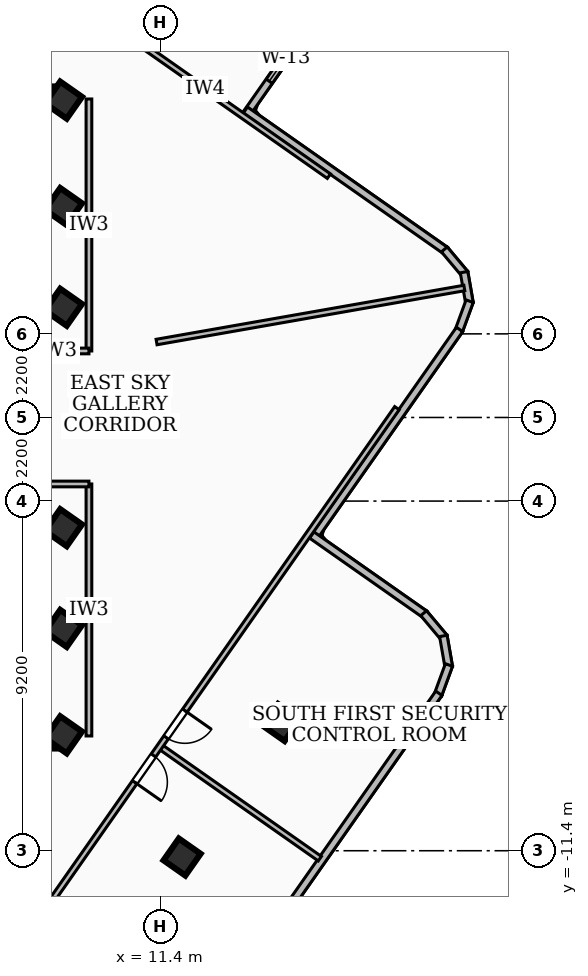
"""IFC4 building model, lengths in metres.
Left out: names, types, materials, properties, quantities, classifications, styles, units other than length and angle.
Written with IfcOpenShell. Run it as: python <this file> out.ifc"""

import sys

from ifc_helpers import new_model, si_unit, direction, frame, frame_2d, origin, origin_2d, place, context, subcontext, project, spatial, rectangle, extrude, element, fill, save


model = new_model("IFC4")
c1 = context("Model", 3, precision=1e-05, world=origin(), true_north=direction((0.0, 1.0)))
c2 = subcontext(c1, "Body", "Model", "MODEL_VIEW")
j1 = project(units=[si_unit("LENGTHUNIT", "METRE"), si_unit("PLANEANGLEUNIT", "RADIAN")], contexts=[c1])
p1 = place(None, origin())
s1 = spatial("IfcSite", under=j1, at=p1, CompositionType="ELEMENT")
p2 = place(p1, origin())
s2 = spatial("IfcBuilding", under=s1, at=p2, CompositionType="ELEMENT")
p3 = place(p2, frame((0.0, 0.0, 268.02)))
s3 = spatial("IfcBuildingStorey", under=s2, at=p3, CompositionType="ELEMENT", Elevation=268.02)
for number, where, z_axis, x_axis in (
    (1, (-8.78, 8.51, 0.0), (0.0, 0.0, 1.0), (1.0, 0.0, 0.0)),
    (2, (8.78, -8.51, 0.0), (0.0, 0.0, 1.0), (-1.0, 0.0, 0.0)),
):
    element("IfcWall", number, at=place(p3, frame(where, z_axis=z_axis, x_axis=x_axis)), inside=s3, PredefinedType="SHEAR", context=c2, shape_type="SweptSolid", body=[
        extrude(rectangle(XDim=17.56, YDim=0.4, at=frame_2d((8.78, 0.0))), origin(), (0.0, 0.0, 1.0), 3.16),
    ])
for number, where, z_axis, x_axis in (
    (3, (8.85, -5.55, 0.0), (0.0, 0.0, 1.0), (0.574, 0.819, 0.0)),
    (4, (8.85, -2.9, 0.0), (0.0, 0.0, 1.0), (0.574, 0.819, 0.0)),
    (5, (8.85, 2.9, 0.0), (0.0, 0.0, 1.0), (0.574, 0.819, 0.0)),
    (6, (8.85, 5.55, 0.0), (0.0, 0.0, 1.0), (0.574, 0.819, 0.0)),
    (7, (8.85, -8.35, 0.0), (0.0, 0.0, 1.0), (0.574, 0.819, 0.0)),
    (8, (8.85, 8.35, 0.0), (0.0, 0.0, 1.0), (0.574, 0.819, 0.0)),
    (9, (11.971, -11.566, 0.0), (0.0, 0.0, 1.0), (0.574, 0.819, 0.0)),
    (10, (14.583, -8.026, 0.0), (0.0, 0.0, 1.0), (0.574, 0.819, 0.0)),
):
    element("IfcColumn", number, at=place(p3, frame(where, z_axis=z_axis, x_axis=x_axis)), inside=s3, PredefinedType="COLUMN", context=c2, shape_type="SweptSolid", body=[
        extrude(rectangle(XDim=0.7, YDim=0.7, at=origin_2d()), origin(), (0.0, 0.0, 1.0), 3.42),
    ])
p4 = place(p3, frame((18.386, 14.724, 0.0), z_axis=(0.0, 0.0, 1.0), x_axis=(-0.574193796103, -0.818719417454, 0.0)))
e11 = element("IfcWall", 11, at=p4, inside=s3, PredefinedType="SOLIDWALL", context=c2, shape_type="SweptSolid", body=[
    extrude(rectangle(XDim=8.241, YDim=0.2, at=frame_2d((4.121, 0.0))), origin(), (0.0, 0.0, 1.0), 3.16),
])
p5 = place(p4, frame((5.678, 0.0, 0.85)))
e12 = element("IfcOpeningElement", 12, at=p5, cuts=e11, PredefinedType="OPENING", context=c2, shape_type="SweptSolid", body=[
    extrude(rectangle(XDim=1.5, YDim=1.8, at=frame_2d((0.75, 0.9))), frame((0.0, 0.11, 0.0), z_axis=(0.0, -1.0, 0.0), x_axis=(1.0, 0.0, 0.0)), (0.0, 0.0, 1.0), 0.22),
])
p6 = place(p3, frame((13.635, 8.088, 0.0), z_axis=(0.0, 0.0, 1.0), x_axis=(0.818654548261, -0.574286279317, 0.0)))
e13 = element("IfcWall", 13, at=p6, inside=s3, PredefinedType="SOLIDWALL", context=c2, shape_type="SweptSolid", body=[
    extrude(rectangle(XDim=6.441, YDim=0.2, at=frame_2d((3.22, 0.0))), origin(), (0.0, 0.0, 1.0), 3.16),
])
p7 = place(p3, frame((18.872, 4.422, 0.0), z_axis=(0.0, 0.0, 1.0), x_axis=(0.642816318642, -0.766020352528, 0.0)))
e14 = element("IfcWall", 14, at=p7, inside=s3, PredefinedType="SOLIDWALL", context=c2, shape_type="SweptSolid", body=[
    extrude(rectangle(XDim=0.838, YDim=0.2, at=frame_2d((0.419, 0.0))), origin(), (0.0, 0.0, 1.0), 3.16),
])
p8 = place(p3, frame((19.391, 3.824, 0.0), z_axis=(0.0, 0.0, 1.0), x_axis=(0.171877988141, -0.985118245285, 0.0)))
e15 = element("IfcWall", 15, at=p8, inside=s3, PredefinedType="SOLIDWALL", context=c2, shape_type="SweptSolid", body=[
    extrude(rectangle(XDim=0.825, YDim=0.2, at=frame_2d((0.413, 0.0))), origin(), (0.0, 0.0, 1.0), 3.16),
])
p9 = place(p3, frame((19.538, 3.059, 0.0), z_axis=(0.0, 0.0, 1.0), x_axis=(-0.344083284363, -0.938939131905, 0.0)))
e16 = element("IfcWall", 16, at=p9, inside=s3, PredefinedType="SOLIDWALL", context=c2, shape_type="SweptSolid", body=[
    extrude(rectangle(XDim=0.837, YDim=0.2, at=frame_2d((0.418, 0.0))), origin(), (0.0, 0.0, 1.0), 3.16),
])
p10 = place(p3, frame((19.273, 2.316, 0.0), z_axis=(0.0, 0.0, 1.0), x_axis=(-0.574227764949, -0.818695592978, 0.0)))
e17 = element("IfcWall", 17, at=p10, inside=s3, PredefinedType="SOLIDWALL", context=c2, shape_type="SweptSolid", body=[
    extrude(rectangle(XDim=6.741, YDim=0.2, at=frame_2d((3.371, 0.0))), origin(), (0.0, 0.0, 1.0), 3.16),
])
p11 = place(p3, frame((15.383, -3.092, 0.0), z_axis=(0.0, 0.0, 1.0), x_axis=(0.818664531158, -0.574272048269, 0.0)))
e18 = element("IfcWall", 18, at=p11, inside=s3, PredefinedType="SOLIDWALL", context=c2, shape_type="SweptSolid", body=[
    extrude(rectangle(XDim=3.641, YDim=0.2, at=frame_2d((1.821, 0.0))), origin(), (0.0, 0.0, 1.0), 3.16),
])
p12 = place(p3, frame((18.328, -5.15, 0.0), z_axis=(0.0, 0.0, 1.0), x_axis=(0.642303159159, -0.766450684477, 0.0)))
e19 = element("IfcWall", 19, at=p12, inside=s3, PredefinedType="SOLIDWALL", context=c2, shape_type="SweptSolid", body=[
    extrude(rectangle(XDim=0.838, YDim=0.2, at=frame_2d((0.419, 0.0))), origin(), (0.0, 0.0, 1.0), 3.16),
])
p13 = place(p3, frame((18.846, -5.748, 0.0), z_axis=(0.0, 0.0, 1.0), x_axis=(0.172165058078, -0.985068115806, 0.0)))
e20 = element("IfcWall", 20, at=p13, inside=s3, PredefinedType="SOLIDWALL", context=c2, shape_type="SweptSolid", body=[
    extrude(rectangle(XDim=0.825, YDim=0.2, at=frame_2d((0.413, 0.0))), origin(), (0.0, 0.0, 1.0), 3.16),
])
p14 = place(p3, frame((18.993, -6.513, 0.0), z_axis=(0.0, 0.0, 1.0), x_axis=(-0.343449935769, -0.93917098636, 0.0)))
e21 = element("IfcWall", 21, at=p14, inside=s3, PredefinedType="SOLIDWALL", context=c2, shape_type="SweptSolid", body=[
    extrude(rectangle(XDim=0.838, YDim=0.2, at=frame_2d((0.419, 0.0))), origin(), (0.0, 0.0, 1.0), 3.16),
])
p15 = place(p3, frame((18.728, -7.257, 0.0), z_axis=(0.0, 0.0, 1.0), x_axis=(-0.574152395536, -0.818748451419, 0.0)))
e22 = element("IfcWall", 22, at=p15, inside=s3, PredefinedType="SOLIDWALL", context=c2, shape_type="SweptSolid", body=[
    extrude(rectangle(XDim=9.923, YDim=0.2, at=frame_2d((4.961, 0.0))), origin(), (0.0, 0.0, 1.0), 3.16),
])
p16 = place(p15, frame((6.99, 0.0, 0.85)))
e23 = element("IfcOpeningElement", 23, at=p16, cuts=e22, PredefinedType="OPENING", context=c2, shape_type="SweptSolid", body=[
    extrude(rectangle(XDim=1.5, YDim=1.8, at=frame_2d((0.75, 0.9))), frame((0.0, 0.11, 0.0), z_axis=(0.0, -1.0, 0.0), x_axis=(1.0, 0.0, 0.0)), (0.0, 0.0, 1.0), 0.22),
])
p17 = place(p3, frame((9.52, 1.75, 0.0), z_axis=(0.0, 0.0, 1.0), x_axis=(0.0, 1.0, 0.0)))
e24 = element("IfcWall", 24, at=p17, inside=s3, PredefinedType="PARTITIONING", context=c2, shape_type="SweptSolid", body=[
    extrude(rectangle(XDim=6.63, YDim=0.15, at=frame_2d((3.315, 0.0))), origin(), (0.0, 0.0, 1.0), 3.16),
])
p18 = place(p3, frame((7.85, 1.75, 0.0), z_axis=(0.0, 0.0, 1.0), x_axis=(1.0, 0.0, 0.0)))
e25 = element("IfcWall", 25, at=p18, inside=s3, PredefinedType="PARTITIONING", context=c2, shape_type="SweptSolid", body=[
    extrude(rectangle(XDim=1.67, YDim=0.15, at=frame_2d((0.835, 0.0))), origin(), (0.0, 0.0, 1.0), 2.39),
])
p19 = place(p3, frame((9.52, -8.38, 0.0), z_axis=(0.0, 0.0, 1.0), x_axis=(0.0, 1.0, 0.0)))
e26 = element("IfcWall", 26, at=p19, inside=s3, PredefinedType="PARTITIONING", context=c2, shape_type="SweptSolid", body=[
    extrude(rectangle(XDim=6.63, YDim=0.15, at=frame_2d((3.315, 0.0))), origin(), (0.0, 0.0, 1.0), 2.53),
])
p20 = place(p3, frame((7.85, -1.75, 0.0), z_axis=(0.0, 0.0, 1.0), x_axis=(1.0, 0.0, 0.0)))
e27 = element("IfcWall", 27, at=p20, inside=s3, PredefinedType="PARTITIONING", context=c2, shape_type="SweptSolid", body=[
    extrude(rectangle(XDim=1.67, YDim=0.15, at=frame_2d((0.835, 0.0))), origin(), (0.0, 0.0, 1.0), 2.39),
])
p21 = place(p3, frame((11.3, 1.985, 0.0), z_axis=(0.0, 0.0, 1.0), x_axis=(0.984932365377, 0.172939976965, 0.0)))
e28 = element("IfcWall", 28, at=p21, inside=s3, PredefinedType="PARTITIONING", context=c2, shape_type="SweptSolid", body=[
    extrude(rectangle(XDim=8.222, YDim=0.145, at=frame_2d((4.111, 0.0))), origin(), (0.0, 0.0, 1.0), 3.16),
])
p22 = place(p3, frame((15.835, 6.349, 0.0), z_axis=(0.0, 0.0, 1.0), x_axis=(-0.818780073776, 0.57410729902, 0.0)))
e29 = element("IfcWall", 29, at=p22, inside=s3, PredefinedType="PARTITIONING", context=c2, shape_type="SweptSolid", body=[
    extrude(rectangle(XDim=7.95, YDim=0.145, at=frame_2d((3.975, 0.0))), origin(), (0.0, 0.0, 1.0), 2.53),
])
p23 = place(p3, frame((11.433, -8.689, 0.0), z_axis=(0.0, 0.0, 1.0), x_axis=(0.81868341552, -0.574245126363, 0.0)))
e30 = element("IfcWall", 30, at=p23, inside=s3, PredefinedType="PARTITIONING", context=c2, shape_type="SweptSolid", body=[
    extrude(rectangle(XDim=5.085, YDim=0.145, at=frame_2d((2.542, 0.0))), origin(), (0.0, 0.0, 1.0), 3.16),
])
p24 = place(p3, frame((17.625, 0.245, 0.0), z_axis=(0.0, 0.0, 1.0), x_axis=(-0.574126736534, -0.818766444352, 0.0)))
e31 = element("IfcWall", 31, at=p24, inside=s3, PredefinedType="PARTITIONING", context=c2, shape_type="SweptSolid", body=[
    extrude(rectangle(XDim=20.34, YDim=0.145, at=frame_2d((10.17, 0.0))), origin(), (0.0, 0.0, 1.0), 2.53),
])
p25 = place(p24, frame((11.16, 0.0, 0.0)))
e32 = element("IfcOpeningElement", 32, at=p25, cuts=e31, PredefinedType="OPENING", context=c2, shape_type="SweptSolid", body=[
    extrude(rectangle(XDim=0.86, YDim=2.04, at=frame_2d((0.43, 1.02))), frame((0.0, 0.083, 0.0), z_axis=(0.0, -1.0, 0.0), x_axis=(1.0, 0.0, 0.0)), (0.0, 0.0, 1.0), 0.165),
])
p26 = place(p24, frame((9.72, 0.0, 0.0)))
e33 = element("IfcOpeningElement", 33, at=p26, cuts=e31, PredefinedType="OPENING", context=c2, shape_type="SweptSolid", body=[
    extrude(rectangle(XDim=0.86, YDim=2.04, at=frame_2d((0.43, 1.02))), frame((0.0, 0.083, 0.0), z_axis=(0.0, -1.0, 0.0), x_axis=(1.0, 0.0, 0.0)), (0.0, 0.0, 1.0), 0.165),
])
p27 = place(p5, origin())
e34 = element("IfcWindow", 34, at=p27, inside=s3, PartitioningType="SINGLE_PANEL", PredefinedType="WINDOW", context=c2, shape_type="SweptSolid", body=[
    extrude(rectangle(XDim=1.5, YDim=1.8, at=frame_2d((0.75, 0.9))), frame((0.0, 0.03, 0.0), z_axis=(0.0, -1.0, 0.0), x_axis=(1.0, 0.0, 0.0)), (0.0, 0.0, 1.0), 0.06),
])
fill(e12, e34)
p28 = place(p25, origin())
e35 = element("IfcDoor", 35, at=p28, inside=s3, OperationType="SINGLE_SWING_RIGHT", PredefinedType="DOOR", context=c2, shape_type="SweptSolid", body=[
    extrude(rectangle(XDim=0.86, YDim=2.04, at=frame_2d((0.43, 1.02))), frame((0.0, 0.025, 0.0), z_axis=(0.0, -1.0, 0.0), x_axis=(1.0, 0.0, 0.0)), (0.0, 0.0, 1.0), 0.05),
])
fill(e32, e35)
p29 = place(p26, origin())
e36 = element("IfcDoor", 36, at=p29, inside=s3, OperationType="SINGLE_SWING_LEFT", PredefinedType="DOOR", context=c2, shape_type="SweptSolid", body=[
    extrude(rectangle(XDim=0.86, YDim=2.04, at=frame_2d((0.43, 1.02))), frame((0.0, 0.025, 0.0), z_axis=(0.0, -1.0, 0.0), x_axis=(1.0, 0.0, 0.0)), (0.0, 0.0, 1.0), 0.05),
])
fill(e33, e36)
save(model, sys.argv[1])
